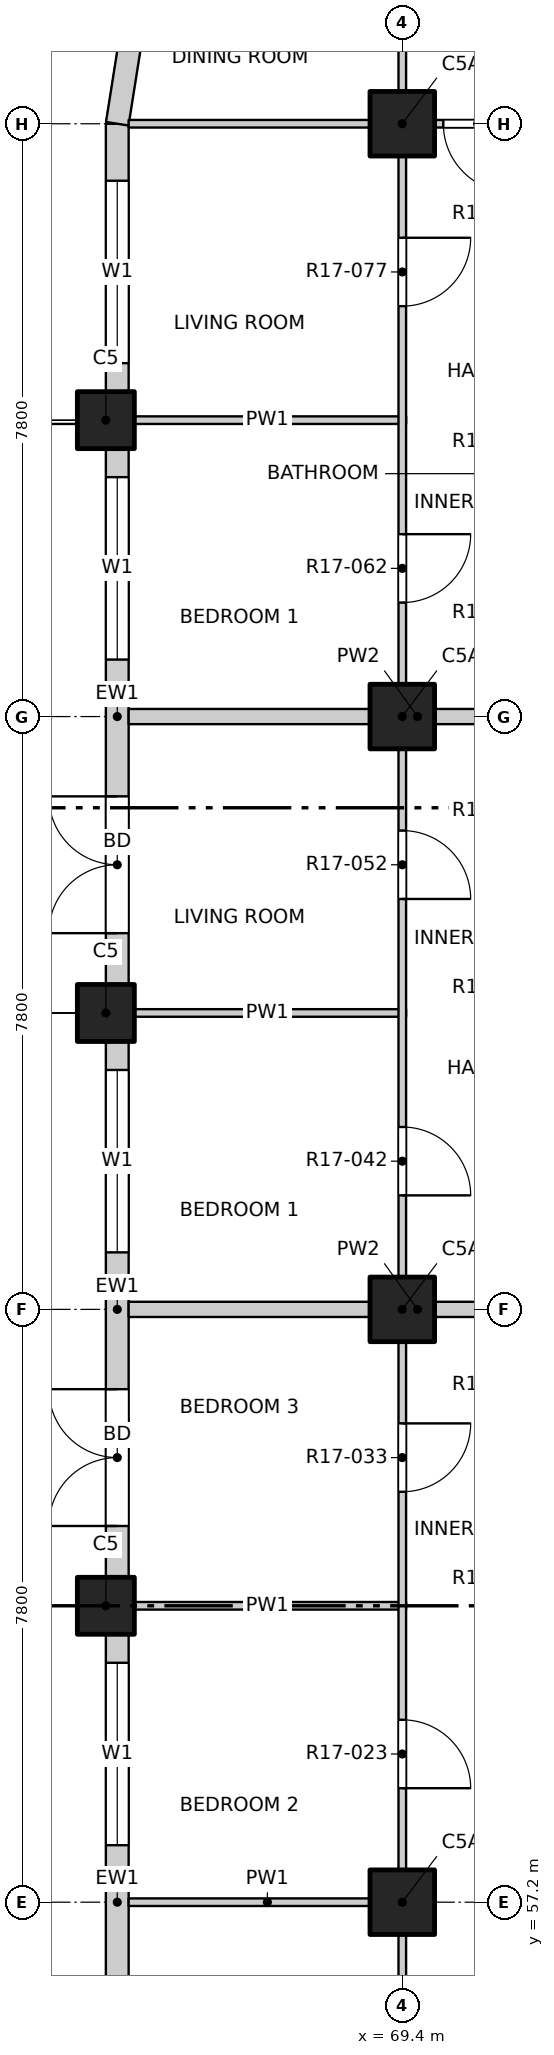
"""IFC4 building model, lengths in metres.
Left out: names, types, materials, properties, quantities, classifications, styles, units other than length and angle.
Written with IfcOpenShell. Run it as: python <this file> out.ifc"""

import sys

from ifc_helpers import new_model, si_unit, direction, frame, frame_2d, origin, origin_2d, place, context, subcontext, project, spatial, rectangle, extrude, element, fill, save


model = new_model("IFC4")
c1 = context("Model", 3, precision=1e-05, world=origin(), true_north=direction((0.0, 1.0)))
c2 = subcontext(c1, "Body", "Model", "MODEL_VIEW")
j1 = project(units=[si_unit("LENGTHUNIT", "METRE"), si_unit("PLANEANGLEUNIT", "RADIAN")], contexts=[c1])
p1 = place(None, origin())
s1 = spatial("IfcSite", under=j1, at=p1, CompositionType="ELEMENT")
p2 = place(p1, origin())
s2 = spatial("IfcBuilding", under=s1, at=p2, CompositionType="ELEMENT")
p3 = place(p2, frame((0.0, 0.0, 179.2)))
s3 = spatial("IfcBuildingStorey", under=s2, at=p3, CompositionType="ELEMENT", Elevation=179.2)
for number, where, z_axis, x_axis in (
    (1, (65.5, 61.1, -0.3), (0.0, 0.0, 1.0), (1.0, 0.0, 0.0)),
    (2, (65.5, 68.9, -0.3), (0.0, 0.0, 1.0), (1.0, 0.0, 0.0)),
    (3, (65.5, 76.7, -0.3), (0.0, 0.0, 1.0), (1.0, 0.0, 0.0)),
):
    element("IfcColumn", number, at=place(p3, frame(where, z_axis=z_axis, x_axis=x_axis)), inside=s3, PredefinedType="COLUMN", context=c2, shape_type="SweptSolid", body=[
        extrude(rectangle(XDim=0.75, YDim=0.75, at=origin_2d()), origin(), (0.0, 0.0, 1.0), 3.45),
    ])
for number, where, z_axis, x_axis in (
    (4, (69.4, 57.2, -0.3), (0.0, 0.0, 1.0), (1.0, 0.0, 0.0)),
    (5, (69.4, 65.0, -0.3), (0.0, 0.0, 1.0), (1.0, 0.0, 0.0)),
    (6, (69.4, 72.8, -0.3), (0.0, 0.0, 1.0), (1.0, 0.0, 0.0)),
    (7, (69.4, 80.6, -0.3), (0.0, 0.0, 1.0), (1.0, 0.0, 0.0)),
):
    element("IfcColumn", number, at=place(p3, frame(where, z_axis=z_axis, x_axis=x_axis)), inside=s3, PredefinedType="COLUMN", context=c2, shape_type="SweptSolid", body=[
        extrude(rectangle(XDim=0.85, YDim=0.85, at=origin_2d()), origin(), (0.0, 0.0, 1.0), 3.45),
    ])
p4 = place(p3, frame((65.65, 53.675, 0.0), z_axis=(0.0, 0.0, 1.0), x_axis=(0.0, 1.0, 0.0)))
e8 = element("IfcWall", 8, at=p4, inside=s3, PredefinedType="SOLIDWALL", context=c2, shape_type="SweptSolid", body=[
    extrude(rectangle(XDim=7.05, YDim=0.3, at=frame_2d((3.525, 0.0))), origin(), (0.0, 0.0, 1.0), 2.7),
])
p5 = place(p4, frame((0.675, 0.0, 0.0)))
e9 = element("IfcOpeningElement", 9, at=p5, cuts=e8, PredefinedType="OPENING", context=c2, shape_type="SweptSolid", body=[
    extrude(rectangle(XDim=1.8, YDim=2.4, at=frame_2d((0.9, 1.2))), frame((0.0, 0.16, 0.0), z_axis=(0.0, -1.0, 0.0), x_axis=(1.0, 0.0, 0.0)), (0.0, 0.0, 1.0), 0.32),
])
p6 = place(p4, frame((4.275, 0.0, 0.9)))
e10 = element("IfcOpeningElement", 10, at=p6, cuts=e8, PredefinedType="OPENING", context=c2, shape_type="SweptSolid", body=[
    extrude(rectangle(XDim=2.4, YDim=1.8, at=frame_2d((1.2, 0.9))), frame((0.0, 0.16, 0.0), z_axis=(0.0, -1.0, 0.0), x_axis=(1.0, 0.0, 0.0)), (0.0, 0.0, 1.0), 0.32),
])
p7 = place(p3, frame((65.65, 61.475, 0.0), z_axis=(0.0, 0.0, 1.0), x_axis=(0.0, 1.0, 0.0)))
e11 = element("IfcWall", 11, at=p7, inside=s3, PredefinedType="SOLIDWALL", context=c2, shape_type="SweptSolid", body=[
    extrude(rectangle(XDim=7.05, YDim=0.3, at=frame_2d((3.525, 0.0))), origin(), (0.0, 0.0, 1.0), 2.7),
])
p8 = place(p7, frame((0.675, 0.0, 0.0)))
e12 = element("IfcOpeningElement", 12, at=p8, cuts=e11, PredefinedType="OPENING", context=c2, shape_type="SweptSolid", body=[
    extrude(rectangle(XDim=1.8, YDim=2.4, at=frame_2d((0.9, 1.2))), frame((0.0, 0.16, 0.0), z_axis=(0.0, -1.0, 0.0), x_axis=(1.0, 0.0, 0.0)), (0.0, 0.0, 1.0), 0.32),
])
p9 = place(p7, frame((4.275, 0.0, 0.9)))
e13 = element("IfcOpeningElement", 13, at=p9, cuts=e11, PredefinedType="OPENING", context=c2, shape_type="SweptSolid", body=[
    extrude(rectangle(XDim=2.4, YDim=1.8, at=frame_2d((1.2, 0.9))), frame((0.0, 0.16, 0.0), z_axis=(0.0, -1.0, 0.0), x_axis=(1.0, 0.0, 0.0)), (0.0, 0.0, 1.0), 0.32),
])
p10 = place(p3, frame((65.65, 69.275, 0.0), z_axis=(0.0, 0.0, 1.0), x_axis=(0.0, 1.0, 0.0)))
e14 = element("IfcWall", 14, at=p10, inside=s3, PredefinedType="SOLIDWALL", context=c2, shape_type="SweptSolid", body=[
    extrude(rectangle(XDim=7.05, YDim=0.3, at=frame_2d((3.525, 0.0))), origin(), (0.0, 0.0, 1.0), 2.7),
])
p11 = place(p10, frame((0.675, 0.0, 0.0)))
e15 = element("IfcOpeningElement", 15, at=p11, cuts=e14, PredefinedType="OPENING", context=c2, shape_type="SweptSolid", body=[
    extrude(rectangle(XDim=1.8, YDim=2.4, at=frame_2d((0.9, 1.2))), frame((0.0, 0.16, 0.0), z_axis=(0.0, -1.0, 0.0), x_axis=(1.0, 0.0, 0.0)), (0.0, 0.0, 1.0), 0.32),
])
p12 = place(p10, frame((4.275, 0.0, 0.9)))
e16 = element("IfcOpeningElement", 16, at=p12, cuts=e14, PredefinedType="OPENING", context=c2, shape_type="SweptSolid", body=[
    extrude(rectangle(XDim=2.4, YDim=1.8, at=frame_2d((1.2, 0.9))), frame((0.0, 0.16, 0.0), z_axis=(0.0, -1.0, 0.0), x_axis=(1.0, 0.0, 0.0)), (0.0, 0.0, 1.0), 0.32),
])
p13 = place(p3, frame((65.65, 77.075, 0.0), z_axis=(0.0, 0.0, 1.0), x_axis=(0.0, 1.0, 0.0)))
e17 = element("IfcWall", 17, at=p13, inside=s3, PredefinedType="SOLIDWALL", context=c2, shape_type="SweptSolid", body=[
    extrude(rectangle(XDim=3.525, YDim=0.3, at=frame_2d((1.763, 0.0))), origin(), (0.0, 0.0, 1.0), 2.7),
])
p14 = place(p13, frame((0.375, 0.0, 0.9)))
e18 = element("IfcOpeningElement", 18, at=p14, cuts=e17, PredefinedType="OPENING", context=c2, shape_type="SweptSolid", body=[
    extrude(rectangle(XDim=2.4, YDim=1.8, at=frame_2d((1.2, 0.9))), frame((0.0, 0.16, 0.0), z_axis=(0.0, -1.0, 0.0), x_axis=(1.0, 0.0, 0.0)), (0.0, 0.0, 1.0), 0.32),
])
p15 = place(p3, frame((65.833, 81.759, 0.0), z_axis=(0.0, 0.0, 1.0), x_axis=(-0.156496880861, -0.987678452879, 0.0)))
e19 = element("IfcWall", 19, at=p15, inside=s3, PredefinedType="SOLIDWALL", context=c2, shape_type="SweptSolid", body=[
    extrude(rectangle(XDim=1.173, YDim=0.3, at=frame_2d((0.586, 0.0))), origin(), (0.0, 0.0, 1.0), 2.7),
])
p16 = place(p3, frame((65.8, 57.2, 0.0), z_axis=(0.0, 0.0, 1.0), x_axis=(1.0, 0.0, 0.0)))
e20 = element("IfcWall", 20, at=p16, inside=s3, PredefinedType="PARTITIONING", context=c2, shape_type="SweptSolid", body=[
    extrude(rectangle(XDim=3.65, YDim=0.1, at=frame_2d((1.825, 0.0))), origin(), (0.0, 0.0, 1.0), 3.15),
])
p17 = place(p3, frame((65.8, 61.1, 0.0), z_axis=(0.0, 0.0, 1.0), x_axis=(1.0, 0.0, 0.0)))
e21 = element("IfcWall", 21, at=p17, inside=s3, PredefinedType="PARTITIONING", context=c2, shape_type="SweptSolid", body=[
    extrude(rectangle(XDim=3.65, YDim=0.1, at=frame_2d((1.825, 0.0))), origin(), (0.0, 0.0, 1.0), 2.55),
])
p18 = place(p3, frame((65.8, 65.0, 0.0), z_axis=(0.0, 0.0, 1.0), x_axis=(1.0, 0.0, 0.0)))
e22 = element("IfcWall", 22, at=p18, inside=s3, PredefinedType="PARTITIONING", context=c2, shape_type="SweptSolid", body=[
    extrude(rectangle(XDim=7.6, YDim=0.2, at=frame_2d((3.8, 0.0))), origin(), (0.0, 0.0, 1.0), 3.15),
])
p19 = place(p3, frame((65.8, 68.9, 0.0), z_axis=(0.0, 0.0, 1.0), x_axis=(1.0, 0.0, 0.0)))
e23 = element("IfcWall", 23, at=p19, inside=s3, PredefinedType="PARTITIONING", context=c2, shape_type="SweptSolid", body=[
    extrude(rectangle(XDim=3.65, YDim=0.1, at=frame_2d((1.825, 0.0))), origin(), (0.0, 0.0, 1.0), 2.55),
])
p20 = place(p3, frame((65.8, 72.8, 0.0), z_axis=(0.0, 0.0, 1.0), x_axis=(1.0, 0.0, 0.0)))
e24 = element("IfcWall", 24, at=p20, inside=s3, PredefinedType="PARTITIONING", context=c2, shape_type="SweptSolid", body=[
    extrude(rectangle(XDim=7.6, YDim=0.2, at=frame_2d((3.8, 0.0))), origin(), (0.0, 0.0, 1.0), 3.15),
])
p21 = place(p3, frame((65.8, 76.7, 0.0), z_axis=(0.0, 0.0, 1.0), x_axis=(1.0, 0.0, 0.0)))
e25 = element("IfcWall", 25, at=p21, inside=s3, PredefinedType="PARTITIONING", context=c2, shape_type="SweptSolid", body=[
    extrude(rectangle(XDim=3.65, YDim=0.1, at=frame_2d((1.825, 0.0))), origin(), (0.0, 0.0, 1.0), 2.55),
])
p22 = place(p3, frame((65.8, 80.6, 0.0), z_axis=(0.0, 0.0, 1.0), x_axis=(1.0, 0.0, 0.0)))
e26 = element("IfcWall", 26, at=p22, inside=s3, PredefinedType="PARTITIONING", context=c2, shape_type="SweptSolid", body=[
    extrude(rectangle(XDim=7.6, YDim=0.1, at=frame_2d((3.8, 0.0))), origin(), (0.0, 0.0, 1.0), 3.15),
])
p23 = place(p22, frame((4.14, 0.0, 0.0)))
e27 = element("IfcOpeningElement", 27, at=p23, cuts=e26, PredefinedType="OPENING", context=c2, shape_type="SweptSolid", body=[
    extrude(rectangle(XDim=0.9, YDim=2.1, at=frame_2d((0.45, 1.05))), frame((0.0, 0.06, 0.0), z_axis=(0.0, -1.0, 0.0), x_axis=(1.0, 0.0, 0.0)), (0.0, 0.0, 1.0), 0.12),
])
p24 = place(p3, frame((69.4, 45.8, 0.0), z_axis=(0.0, 0.0, 1.0), x_axis=(0.0, 1.0, 0.0)))
e28 = element("IfcWall", 28, at=p24, inside=s3, PredefinedType="PARTITIONING", context=c2, shape_type="SweptSolid", body=[
    extrude(rectangle(XDim=38.4, YDim=0.1, at=frame_2d((19.2, 0.0))), origin(), (0.0, 0.0, 1.0), 3.15),
])
p25 = place(p24, frame((1.05, 0.0, 0.0)))
e29 = element("IfcOpeningElement", 29, at=p25, cuts=e28, PredefinedType="OPENING", context=c2, shape_type="SweptSolid", body=[
    extrude(rectangle(XDim=1.2, YDim=2.1, at=frame_2d((0.6, 1.05))), frame((0.0, 0.06, 0.0), z_axis=(0.0, -1.0, 0.0), x_axis=(1.0, 0.0, 0.0)), (0.0, 0.0, 1.0), 0.12),
])
p26 = place(p24, frame((6.9, 0.0, 0.0)))
e30 = element("IfcOpeningElement", 30, at=p26, cuts=e28, PredefinedType="OPENING", context=c2, shape_type="SweptSolid", body=[
    extrude(rectangle(XDim=1.2, YDim=2.1, at=frame_2d((0.6, 1.05))), frame((0.0, 0.06, 0.0), z_axis=(0.0, -1.0, 0.0), x_axis=(1.0, 0.0, 0.0)), (0.0, 0.0, 1.0), 0.12),
])
p27 = place(p24, frame((12.9, 0.0, 0.0)))
e31 = element("IfcOpeningElement", 31, at=p27, cuts=e28, PredefinedType="OPENING", context=c2, shape_type="SweptSolid", body=[
    extrude(rectangle(XDim=0.9, YDim=2.1, at=frame_2d((0.45, 1.05))), frame((0.0, 0.06, 0.0), z_axis=(0.0, -1.0, 0.0), x_axis=(1.0, 0.0, 0.0)), (0.0, 0.0, 1.0), 0.12),
])
p28 = place(p24, frame((16.8, 0.0, 0.0)))
e32 = element("IfcOpeningElement", 32, at=p28, cuts=e28, PredefinedType="OPENING", context=c2, shape_type="SweptSolid", body=[
    extrude(rectangle(XDim=0.9, YDim=2.1, at=frame_2d((0.45, 1.05))), frame((0.0, 0.06, 0.0), z_axis=(0.0, -1.0, 0.0), x_axis=(1.0, 0.0, 0.0)), (0.0, 0.0, 1.0), 0.12),
])
p29 = place(p24, frame((20.7, 0.0, 0.0)))
e33 = element("IfcOpeningElement", 33, at=p29, cuts=e28, PredefinedType="OPENING", context=c2, shape_type="SweptSolid", body=[
    extrude(rectangle(XDim=0.9, YDim=2.1, at=frame_2d((0.45, 1.05))), frame((0.0, 0.06, 0.0), z_axis=(0.0, -1.0, 0.0), x_axis=(1.0, 0.0, 0.0)), (0.0, 0.0, 1.0), 0.12),
])
p30 = place(p24, frame((24.6, 0.0, 0.0)))
e34 = element("IfcOpeningElement", 34, at=p30, cuts=e28, PredefinedType="OPENING", context=c2, shape_type="SweptSolid", body=[
    extrude(rectangle(XDim=0.9, YDim=2.1, at=frame_2d((0.45, 1.05))), frame((0.0, 0.06, 0.0), z_axis=(0.0, -1.0, 0.0), x_axis=(1.0, 0.0, 0.0)), (0.0, 0.0, 1.0), 0.12),
])
p31 = place(p24, frame((28.5, 0.0, 0.0)))
e35 = element("IfcOpeningElement", 35, at=p31, cuts=e28, PredefinedType="OPENING", context=c2, shape_type="SweptSolid", body=[
    extrude(rectangle(XDim=0.9, YDim=2.1, at=frame_2d((0.45, 1.05))), frame((0.0, 0.06, 0.0), z_axis=(0.0, -1.0, 0.0), x_axis=(1.0, 0.0, 0.0)), (0.0, 0.0, 1.0), 0.12),
])
p32 = place(p24, frame((32.4, 0.0, 0.0)))
e36 = element("IfcOpeningElement", 36, at=p32, cuts=e28, PredefinedType="OPENING", context=c2, shape_type="SweptSolid", body=[
    extrude(rectangle(XDim=0.9, YDim=2.1, at=frame_2d((0.45, 1.05))), frame((0.0, 0.06, 0.0), z_axis=(0.0, -1.0, 0.0), x_axis=(1.0, 0.0, 0.0)), (0.0, 0.0, 1.0), 0.12),
])
p33 = place(p24, frame((36.15, 0.0, 0.0)))
e37 = element("IfcOpeningElement", 37, at=p33, cuts=e28, PredefinedType="OPENING", context=c2, shape_type="SweptSolid", body=[
    extrude(rectangle(XDim=1.2, YDim=2.1, at=frame_2d((0.6, 1.05))), frame((0.0, 0.06, 0.0), z_axis=(0.0, -1.0, 0.0), x_axis=(1.0, 0.0, 0.0)), (0.0, 0.0, 1.0), 0.12),
])
p34 = place(p6, origin())
e38 = element("IfcWindow", 38, at=p34, inside=s3, PartitioningType="DOUBLE_PANEL_VERTICAL", PredefinedType="WINDOW", context=c2, shape_type="SweptSolid", body=[
    extrude(rectangle(XDim=2.4, YDim=1.8, at=frame_2d((1.2, 0.9))), frame((0.0, 0.03, 0.0), z_axis=(0.0, -1.0, 0.0), x_axis=(1.0, 0.0, 0.0)), (0.0, 0.0, 1.0), 0.06),
])
fill(e10, e38)
p35 = place(p8, origin())
e39 = element("IfcDoor", 39, at=p35, inside=s3, OperationType="DOUBLE_DOOR_SINGLE_SWING", PredefinedType="DOOR", context=c2, shape_type="SweptSolid", body=[
    extrude(rectangle(XDim=1.8, YDim=2.4, at=frame_2d((0.9, 1.2))), frame((0.0, 0.025, 0.0), z_axis=(0.0, -1.0, 0.0), x_axis=(1.0, 0.0, 0.0)), (0.0, 0.0, 1.0), 0.05),
])
fill(e12, e39)
p36 = place(p9, origin())
e40 = element("IfcWindow", 40, at=p36, inside=s3, PartitioningType="DOUBLE_PANEL_VERTICAL", PredefinedType="WINDOW", context=c2, shape_type="SweptSolid", body=[
    extrude(rectangle(XDim=2.4, YDim=1.8, at=frame_2d((1.2, 0.9))), frame((0.0, 0.03, 0.0), z_axis=(0.0, -1.0, 0.0), x_axis=(1.0, 0.0, 0.0)), (0.0, 0.0, 1.0), 0.06),
])
fill(e13, e40)
p37 = place(p11, origin())
e41 = element("IfcDoor", 41, at=p37, inside=s3, OperationType="DOUBLE_DOOR_SINGLE_SWING", PredefinedType="DOOR", context=c2, shape_type="SweptSolid", body=[
    extrude(rectangle(XDim=1.8, YDim=2.4, at=frame_2d((0.9, 1.2))), frame((0.0, 0.025, 0.0), z_axis=(0.0, -1.0, 0.0), x_axis=(1.0, 0.0, 0.0)), (0.0, 0.0, 1.0), 0.05),
])
fill(e15, e41)
p38 = place(p12, origin())
e42 = element("IfcWindow", 42, at=p38, inside=s3, PartitioningType="DOUBLE_PANEL_VERTICAL", PredefinedType="WINDOW", context=c2, shape_type="SweptSolid", body=[
    extrude(rectangle(XDim=2.4, YDim=1.8, at=frame_2d((1.2, 0.9))), frame((0.0, 0.03, 0.0), z_axis=(0.0, -1.0, 0.0), x_axis=(1.0, 0.0, 0.0)), (0.0, 0.0, 1.0), 0.06),
])
fill(e16, e42)
p39 = place(p14, origin())
e43 = element("IfcWindow", 43, at=p39, inside=s3, PartitioningType="DOUBLE_PANEL_VERTICAL", PredefinedType="WINDOW", context=c2, shape_type="SweptSolid", body=[
    extrude(rectangle(XDim=2.4, YDim=1.8, at=frame_2d((1.2, 0.9))), frame((0.0, 0.03, 0.0), z_axis=(0.0, -1.0, 0.0), x_axis=(1.0, 0.0, 0.0)), (0.0, 0.0, 1.0), 0.06),
])
fill(e18, e43)
p40 = place(p27, origin())
e44 = element("IfcDoor", 44, at=p40, inside=s3, OperationType="SINGLE_SWING_RIGHT", PredefinedType="DOOR", context=c2, shape_type="SweptSolid", body=[
    extrude(rectangle(XDim=0.9, YDim=2.1, at=frame_2d((0.45, 1.05))), frame((0.0, 0.025, 0.0), z_axis=(0.0, -1.0, 0.0), x_axis=(1.0, 0.0, 0.0)), (0.0, 0.0, 1.0), 0.05),
])
fill(e31, e44)
p41 = place(p28, origin())
e45 = element("IfcDoor", 45, at=p41, inside=s3, OperationType="SINGLE_SWING_LEFT", PredefinedType="DOOR", context=c2, shape_type="SweptSolid", body=[
    extrude(rectangle(XDim=0.9, YDim=2.1, at=frame_2d((0.45, 1.05))), frame((0.0, 0.025, 0.0), z_axis=(0.0, -1.0, 0.0), x_axis=(1.0, 0.0, 0.0)), (0.0, 0.0, 1.0), 0.05),
])
fill(e32, e45)
p42 = place(p29, origin())
e46 = element("IfcDoor", 46, at=p42, inside=s3, OperationType="SINGLE_SWING_RIGHT", PredefinedType="DOOR", context=c2, shape_type="SweptSolid", body=[
    extrude(rectangle(XDim=0.9, YDim=2.1, at=frame_2d((0.45, 1.05))), frame((0.0, 0.025, 0.0), z_axis=(0.0, -1.0, 0.0), x_axis=(1.0, 0.0, 0.0)), (0.0, 0.0, 1.0), 0.05),
])
fill(e33, e46)
p43 = place(p30, origin())
e47 = element("IfcDoor", 47, at=p43, inside=s3, OperationType="SINGLE_SWING_RIGHT", PredefinedType="DOOR", context=c2, shape_type="SweptSolid", body=[
    extrude(rectangle(XDim=0.9, YDim=2.1, at=frame_2d((0.45, 1.05))), frame((0.0, 0.025, 0.0), z_axis=(0.0, -1.0, 0.0), x_axis=(1.0, 0.0, 0.0)), (0.0, 0.0, 1.0), 0.05),
])
fill(e34, e47)
p44 = place(p31, origin())
e48 = element("IfcDoor", 48, at=p44, inside=s3, OperationType="SINGLE_SWING_LEFT", PredefinedType="DOOR", context=c2, shape_type="SweptSolid", body=[
    extrude(rectangle(XDim=0.9, YDim=2.1, at=frame_2d((0.45, 1.05))), frame((0.0, 0.025, 0.0), z_axis=(0.0, -1.0, 0.0), x_axis=(1.0, 0.0, 0.0)), (0.0, 0.0, 1.0), 0.05),
])
fill(e35, e48)
p45 = place(p32, origin())
e49 = element("IfcDoor", 49, at=p45, inside=s3, OperationType="SINGLE_SWING_LEFT", PredefinedType="DOOR", context=c2, shape_type="SweptSolid", body=[
    extrude(rectangle(XDim=0.9, YDim=2.1, at=frame_2d((0.45, 1.05))), frame((0.0, 0.025, 0.0), z_axis=(0.0, -1.0, 0.0), x_axis=(1.0, 0.0, 0.0)), (0.0, 0.0, 1.0), 0.05),
])
fill(e36, e49)
p46 = place(p23, origin())
e50 = element("IfcDoor", 50, at=p46, inside=s3, OperationType="SINGLE_SWING_LEFT", PredefinedType="DOOR", context=c2, shape_type="SweptSolid", body=[
    extrude(rectangle(XDim=0.9, YDim=2.1, at=frame_2d((0.45, 1.05))), frame((0.0, 0.025, 0.0), z_axis=(0.0, -1.0, 0.0), x_axis=(1.0, 0.0, 0.0)), (0.0, 0.0, 1.0), 0.05),
])
fill(e27, e50)
save(model, sys.argv[1])
